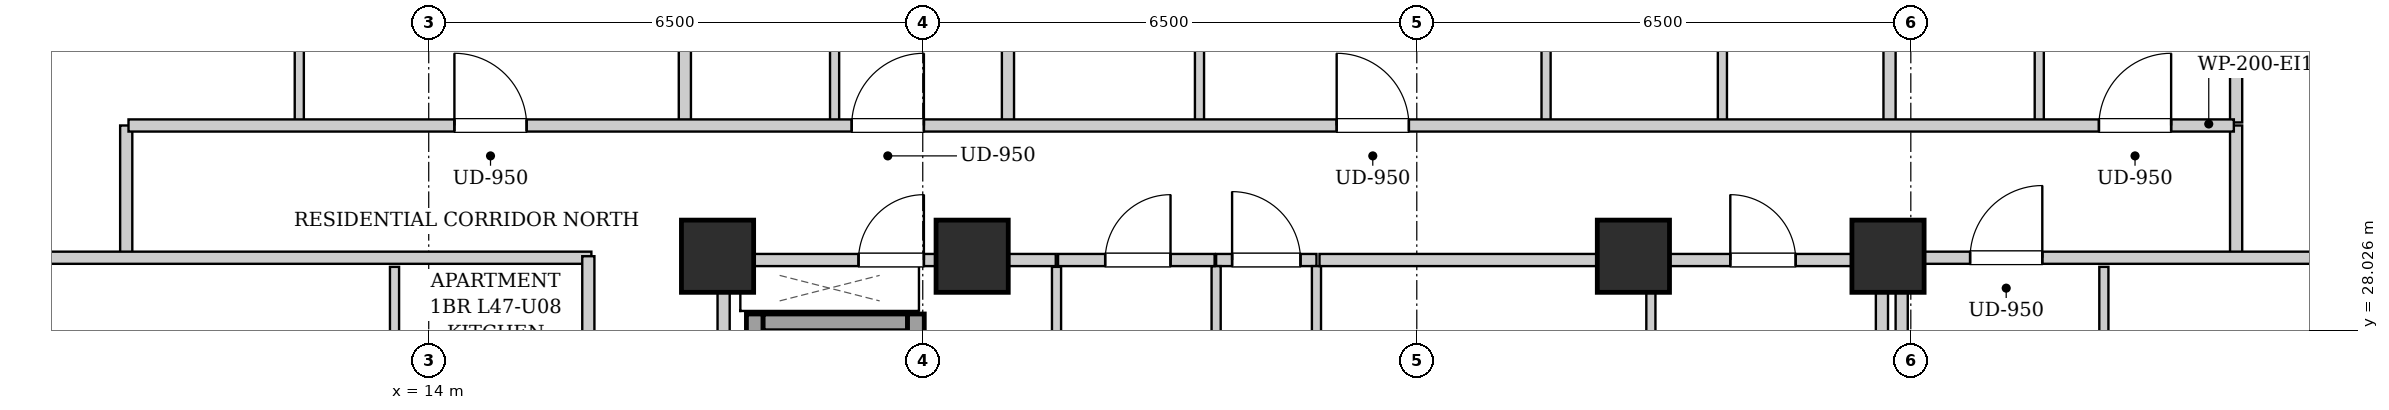
"""IFC4 building model, lengths in metres.
Left out: names, types, materials, properties, quantities, classifications, styles, units other than length and angle.
Written with IfcOpenShell. Run it as: python <this file> out.ifc"""

import sys

from ifc_helpers import new_model, si_unit, direction, frame, frame_2d, origin, origin_2d, place, context, subcontext, project, spatial, rectangle, extrude, element, fill, save


model = new_model("IFC4")
c1 = context("Model", 3, precision=1e-05, world=origin(), true_north=direction((0.0, 1.0)))
c2 = subcontext(c1, "Body", "Model", "MODEL_VIEW")
j1 = project(units=[si_unit("LENGTHUNIT", "METRE"), si_unit("PLANEANGLEUNIT", "RADIAN")], contexts=[c1])
p1 = place(None, origin())
s1 = spatial("IfcSite", under=j1, at=p1, CompositionType="ELEMENT")
p2 = place(p1, origin())
s2 = spatial("IfcBuilding", under=s1, at=p2, CompositionType="ELEMENT")
p3 = place(p2, frame((0.0, 0.0, 163.4)))
s3 = spatial("IfcBuildingStorey", under=s2, at=p3, CompositionType="ELEMENT", Elevation=163.4)
for number, where, z_axis, x_axis in (
    (1, (17.8, 29.0, 0.0), (0.0, 0.0, 1.0), (1.0, 0.0, 0.0)),
    (2, (21.15, 29.0, 0.0), (0.0, 0.0, 1.0), (1.0, 0.0, 0.0)),
    (3, (29.85, 29.0, 0.0), (0.0, 0.0, 1.0), (1.0, 0.0, 0.0)),
    (4, (33.2, 29.0, 0.0), (0.0, 0.0, 1.0), (1.0, 0.0, 0.0)),
):
    element("IfcColumn", number, at=place(p3, frame(where, z_axis=z_axis, x_axis=x_axis)), inside=s3, PredefinedType="COLUMN", context=c2, shape_type="SweptSolid", body=[
        extrude(rectangle(XDim=0.95, YDim=0.95, at=origin_2d()), origin(), (0.0, 0.0, 1.0), 3.25),
    ])
p4 = place(p3, frame((18.29, 24.1, 0.0), z_axis=(0.0, 0.0, 1.0), x_axis=(0.0, 1.0, 0.0)))
e5 = element("IfcWall", 5, at=p4, inside=s3, PredefinedType="SHEAR", context=c2, shape_type="SweptSolid", body=[
    extrude(rectangle(XDim=4.14, YDim=0.22, at=frame_2d((2.07, 0.0))), origin(), (0.0, 0.0, 1.0), 2.99),
])
p5 = place(p3, frame((18.4, 28.13, 0.0), z_axis=(0.0, 0.0, 1.0), x_axis=(1.0, 0.0, 0.0)))
e6 = element("IfcWall", 6, at=p5, inside=s3, PredefinedType="SHEAR", context=c2, shape_type="SweptSolid", body=[
    extrude(rectangle(XDim=1.9, YDim=0.22, at=frame_2d((0.95, 0.0))), origin(), (0.0, 0.0, 1.0), 2.99),
])
p6 = place(p3, frame((20.41, 26.06, 0.0), z_axis=(0.0, 0.0, 1.0), x_axis=(0.0, 1.0, 0.0)))
e7 = element("IfcWall", 7, at=p6, inside=s3, PredefinedType="SHEAR", context=c2, shape_type="SweptSolid", body=[
    extrude(rectangle(XDim=2.18, YDim=0.22, at=frame_2d((1.09, 0.0))), origin(), (0.0, 0.0, 1.0), 2.99),
])
for number, where, z_axis, x_axis in (
    (8, (17.88, 24.12, 0.0), (0.0, 0.0, 1.0), (0.0, 1.0, 0.0)),
    (9, (33.12, 24.12, 0.0), (0.0, 0.0, 1.0), (0.0, 1.0, 0.0)),
):
    element("IfcWall", number, at=place(p3, frame(where, z_axis=z_axis, x_axis=x_axis)), inside=s3, PredefinedType="PARTITIONING", context=c2, shape_type="SweptSolid", body=[
        extrude(rectangle(XDim=4.76, YDim=0.16, at=frame_2d((2.38, 0.0))), origin(), (0.0, 0.0, 1.0), 2.99),
    ])
p7 = place(p3, frame((24.36, 28.95, 0.0), z_axis=(0.0, 0.0, 1.0), x_axis=(1.0, 0.0, 0.0)))
e10 = element("IfcWall", 10, at=p7, inside=s3, PredefinedType="PARTITIONING", context=c2, shape_type="SweptSolid", body=[
    extrude(rectangle(XDim=1.32, YDim=0.16, at=frame_2d((0.66, 0.0))), origin(), (0.0, 0.0, 1.0), 2.442),
])
p8 = place(p7, frame((0.21, 0.0, 0.0)))
e11 = element("IfcOpeningElement", 11, at=p8, cuts=e10, PredefinedType="OPENING", context=c2, shape_type="SweptSolid", body=[
    extrude(rectangle(XDim=0.9, YDim=2.05, at=frame_2d((0.45, 1.025))), frame((0.0, 0.09, 0.0), z_axis=(0.0, -1.0, 0.0), x_axis=(1.0, 0.0, 0.0)), (0.0, 0.0, 1.0), 0.18),
])
p9 = place(p3, frame((17.96, 28.95, 0.0), z_axis=(0.0, 0.0, 1.0), x_axis=(1.0, 0.0, 0.0)))
e12 = element("IfcWall", 12, at=p9, inside=s3, PredefinedType="PARTITIONING", context=c2, shape_type="SweptSolid", body=[
    extrude(rectangle(XDim=4.29, YDim=0.16, at=frame_2d((2.145, 0.0))), origin(), (0.0, 0.0, 1.0), 2.442),
])
p10 = place(p9, frame((1.695, 0.0, 0.0)))
e13 = element("IfcOpeningElement", 13, at=p10, cuts=e12, PredefinedType="OPENING", context=c2, shape_type="SweptSolid", body=[
    extrude(rectangle(XDim=0.86, YDim=2.05, at=frame_2d((0.43, 1.025))), frame((0.0, 0.09, 0.0), z_axis=(0.0, -1.0, 0.0), x_axis=(1.0, 0.0, 0.0)), (0.0, 0.0, 1.0), 0.18),
])
for number, where, z_axis, x_axis in (
    (14, (24.36, 25.0, 0.0), (0.0, 0.0, 1.0), (0.0, 1.0, 0.0)),
    (15, (25.68, 25.0, 0.0), (0.0, 0.0, 1.0), (0.0, 1.0, 0.0)),
):
    element("IfcWall", number, at=place(p3, frame(where, z_axis=z_axis, x_axis=x_axis)), inside=s3, PredefinedType="PARTITIONING", context=c2, shape_type="SweptSolid", body=[
        extrude(rectangle(XDim=3.87, YDim=0.12, at=frame_2d((1.935, 0.0))), origin(), (0.0, 0.0, 1.0), 2.99),
    ])
p11 = place(p3, frame((30.08, 26.18, 0.0), z_axis=(0.0, 0.0, 1.0), x_axis=(0.0, 1.0, 0.0)))
e16 = element("IfcWall", 16, at=p11, inside=s3, PredefinedType="PARTITIONING", context=c2, shape_type="SweptSolid", body=[
    extrude(rectangle(XDim=2.68, YDim=0.12, at=frame_2d((1.34, 0.0))), origin(), (0.0, 0.0, 1.0), 2.99),
])
p12 = place(p3, frame((30.08, 28.95, 0.0), z_axis=(0.0, 0.0, 1.0), x_axis=(1.0, 0.0, 0.0)))
e17 = element("IfcWall", 17, at=p12, inside=s3, PredefinedType="PARTITIONING", context=c2, shape_type="SweptSolid", body=[
    extrude(rectangle(XDim=2.96, YDim=0.16, at=frame_2d((1.48, 0.0))), origin(), (0.0, 0.0, 1.0), 2.99),
])
p13 = place(p12, frame((1.045, 0.0, 0.0)))
e18 = element("IfcOpeningElement", 18, at=p13, cuts=e17, PredefinedType="OPENING", context=c2, shape_type="SweptSolid", body=[
    extrude(rectangle(XDim=0.86, YDim=2.05, at=frame_2d((0.43, 1.025))), frame((0.0, 0.09, 0.0), z_axis=(0.0, -1.0, 0.0), x_axis=(1.0, 0.0, 0.0)), (0.0, 0.0, 1.0), 0.18),
])
p14 = place(p3, frame((22.26, 25.0, 0.0), z_axis=(0.0, 0.0, 1.0), x_axis=(0.0, 1.0, 0.0)))
e19 = element("IfcWall", 19, at=p14, inside=s3, PredefinedType="PARTITIONING", context=c2, shape_type="SweptSolid", body=[
    extrude(rectangle(XDim=3.86, YDim=0.12, at=frame_2d((1.93, 0.0))), origin(), (0.0, 0.0, 1.0), 2.99),
])
p15 = place(p3, frame((22.28, 28.95, 0.0), z_axis=(0.0, 0.0, 1.0), x_axis=(1.0, 0.0, 0.0)))
e20 = element("IfcWall", 20, at=p15, inside=s3, PredefinedType="PARTITIONING", context=c2, shape_type="SweptSolid", body=[
    extrude(rectangle(XDim=2.06, YDim=0.16, at=frame_2d((1.03, 0.0))), origin(), (0.0, 0.0, 1.0), 2.442),
])
p16 = place(p15, frame((0.62, 0.0, 0.0)))
e21 = element("IfcOpeningElement", 21, at=p16, cuts=e20, PredefinedType="OPENING", context=c2, shape_type="SweptSolid", body=[
    extrude(rectangle(XDim=0.86, YDim=2.05, at=frame_2d((0.43, 1.025))), frame((0.0, 0.09, 0.0), z_axis=(0.0, -1.0, 0.0), x_axis=(1.0, 0.0, 0.0)), (0.0, 0.0, 1.0), 0.18),
])
p17 = place(p3, frame((25.72, 28.95, 0.0), z_axis=(0.0, 0.0, 1.0), x_axis=(1.0, 0.0, 0.0)))
e22 = element("IfcWall", 22, at=p17, inside=s3, PredefinedType="PARTITIONING", context=c2, shape_type="SweptSolid", body=[
    extrude(rectangle(XDim=4.32, YDim=0.16, at=frame_2d((2.16, 0.0))), origin(), (0.0, 0.0, 1.0), 2.442),
])
for number, where, z_axis, x_axis in (
    (23, (10.02, 28.98, 0.0), (0.0, 0.0, 1.0), (0.0, 1.0, 0.0)),
    (24, (37.78, 28.98, 0.0), (0.0, 0.0, 1.0), (0.0, 1.0, 0.0)),
):
    element("IfcWall", number, at=place(p3, frame(where, z_axis=z_axis, x_axis=x_axis)), inside=s3, PredefinedType="PARTITIONING", context=c2, shape_type="SweptSolid", body=[
        extrude(rectangle(XDim=1.74, YDim=0.16, at=frame_2d((0.87, 0.0))), origin(), (0.0, 0.0, 1.0), 2.99),
    ])
p18 = place(p3, frame((7.78, 28.98, 0.0), z_axis=(0.0, 0.0, 1.0), x_axis=(1.0, 0.0, 0.0)))
e25 = element("IfcWall", 25, at=p18, inside=s3, PredefinedType="PARTITIONING", context=c2, shape_type="SweptSolid", body=[
    extrude(rectangle(XDim=8.36, YDim=0.16, at=frame_2d((4.18, 0.0))), origin(), (0.0, 0.0, 1.0), 2.442),
])
p19 = place(p3, frame((12.297, 30.76, 0.0), z_axis=(0.0, 0.0, 1.0), x_axis=(0.0, 1.0, 0.0)))
e26 = element("IfcWall", 26, at=p19, inside=s3, PredefinedType="PARTITIONING", context=c2, shape_type="SweptSolid", body=[
    extrude(rectangle(XDim=2.85, YDim=0.12, at=frame_2d((1.425, 0.0))), origin(), (0.0, 0.0, 1.0), 2.99),
])
p20 = place(p19, frame((0.995, 0.0, 0.0)))
e27 = element("IfcOpeningElement", 27, at=p20, cuts=e26, PredefinedType="OPENING", context=c2, shape_type="SweptSolid", body=[
    extrude(rectangle(XDim=0.86, YDim=2.05, at=frame_2d((0.43, 1.025))), frame((0.0, 0.07, 0.0), z_axis=(0.0, -1.0, 0.0), x_axis=(1.0, 0.0, 0.0)), (0.0, 0.0, 1.0), 0.14),
])
p21 = place(p3, frame((17.37, 30.76, 0.0), z_axis=(0.0, 0.0, 1.0), x_axis=(0.0, 1.0, 0.0)))
e28 = element("IfcWall", 28, at=p21, inside=s3, PredefinedType="PARTITIONING", context=c2, shape_type="SweptSolid", body=[
    extrude(rectangle(XDim=12.26, YDim=0.16, at=frame_2d((6.13, 0.0))), origin(), (0.0, 0.0, 1.0), 2.99),
])
p22 = place(p3, frame((19.34, 30.76, 0.0), z_axis=(0.0, 0.0, 1.0), x_axis=(0.0, 1.0, 0.0)))
e29 = element("IfcWall", 29, at=p22, inside=s3, PredefinedType="PARTITIONING", context=c2, shape_type="SweptSolid", body=[
    extrude(rectangle(XDim=2.85, YDim=0.12, at=frame_2d((1.425, 0.0))), origin(), (0.0, 0.0, 1.0), 2.99),
])
p23 = place(p22, frame((0.995, 0.0, 0.0)))
e30 = element("IfcOpeningElement", 30, at=p23, cuts=e29, PredefinedType="OPENING", context=c2, shape_type="SweptSolid", body=[
    extrude(rectangle(XDim=0.86, YDim=2.05, at=frame_2d((0.43, 1.025))), frame((0.0, 0.07, 0.0), z_axis=(0.0, -1.0, 0.0), x_axis=(1.0, 0.0, 0.0)), (0.0, 0.0, 1.0), 0.14),
])
p24 = place(p3, frame((21.621, 30.76, 0.0), z_axis=(0.0, 0.0, 1.0), x_axis=(0.0, 1.0, 0.0)))
e31 = element("IfcWall", 31, at=p24, inside=s3, PredefinedType="PARTITIONING", context=c2, shape_type="SweptSolid", body=[
    extrude(rectangle(XDim=12.26, YDim=0.16, at=frame_2d((6.13, 0.0))), origin(), (0.0, 0.0, 1.0), 2.99),
])
p25 = place(p3, frame((24.141, 30.76, 0.0), z_axis=(0.0, 0.0, 1.0), x_axis=(0.0, 1.0, 0.0)))
e32 = element("IfcWall", 32, at=p25, inside=s3, PredefinedType="PARTITIONING", context=c2, shape_type="SweptSolid", body=[
    extrude(rectangle(XDim=2.85, YDim=0.12, at=frame_2d((1.425, 0.0))), origin(), (0.0, 0.0, 1.0), 2.99),
])
p26 = place(p25, frame((0.995, 0.0, 0.0)))
e33 = element("IfcOpeningElement", 33, at=p26, cuts=e32, PredefinedType="OPENING", context=c2, shape_type="SweptSolid", body=[
    extrude(rectangle(XDim=0.86, YDim=2.05, at=frame_2d((0.43, 1.025))), frame((0.0, 0.07, 0.0), z_axis=(0.0, -1.0, 0.0), x_axis=(1.0, 0.0, 0.0)), (0.0, 0.0, 1.0), 0.14),
])
p27 = place(p3, frame((28.701, 30.76, 0.0), z_axis=(0.0, 0.0, 1.0), x_axis=(0.0, 1.0, 0.0)))
e34 = element("IfcWall", 34, at=p27, inside=s3, PredefinedType="PARTITIONING", context=c2, shape_type="SweptSolid", body=[
    extrude(rectangle(XDim=2.85, YDim=0.12, at=frame_2d((1.425, 0.0))), origin(), (0.0, 0.0, 1.0), 2.99),
])
p28 = place(p27, frame((0.975, 0.0, 0.0)))
e35 = element("IfcOpeningElement", 35, at=p28, cuts=e34, PredefinedType="OPENING", context=c2, shape_type="SweptSolid", body=[
    extrude(rectangle(XDim=0.9, YDim=2.05, at=frame_2d((0.45, 1.025))), frame((0.0, 0.07, 0.0), z_axis=(0.0, -1.0, 0.0), x_axis=(1.0, 0.0, 0.0)), (0.0, 0.0, 1.0), 0.14),
])
p29 = place(p3, frame((31.021, 30.76, 0.0), z_axis=(0.0, 0.0, 1.0), x_axis=(0.0, 1.0, 0.0)))
e36 = element("IfcWall", 36, at=p29, inside=s3, PredefinedType="PARTITIONING", context=c2, shape_type="SweptSolid", body=[
    extrude(rectangle(XDim=2.85, YDim=0.12, at=frame_2d((1.425, 0.0))), origin(), (0.0, 0.0, 1.0), 2.99),
])
p30 = place(p29, frame((0.975, 0.0, 0.0)))
e37 = element("IfcOpeningElement", 37, at=p30, cuts=e36, PredefinedType="OPENING", context=c2, shape_type="SweptSolid", body=[
    extrude(rectangle(XDim=0.9, YDim=2.05, at=frame_2d((0.45, 1.025))), frame((0.0, 0.07, 0.0), z_axis=(0.0, -1.0, 0.0), x_axis=(1.0, 0.0, 0.0)), (0.0, 0.0, 1.0), 0.14),
])
p31 = place(p3, frame((37.78, 30.76, 0.0), z_axis=(0.0, 0.0, 1.0), x_axis=(0.0, 1.0, 0.0)))
e38 = element("IfcWall", 38, at=p31, inside=s3, PredefinedType="PARTITIONING", context=c2, shape_type="SweptSolid", body=[
    extrude(rectangle(XDim=2.91, YDim=0.16, at=frame_2d((1.455, 0.0))), origin(), (0.0, 0.0, 1.0), 2.99),
])
p32 = place(p3, frame((33.22, 30.76, 0.0), z_axis=(0.0, 0.0, 1.0), x_axis=(0.0, 1.0, 0.0)))
e39 = element("IfcWall", 39, at=p32, inside=s3, PredefinedType="PARTITIONING", context=c2, shape_type="SweptSolid", body=[
    extrude(rectangle(XDim=10.28, YDim=0.16, at=frame_2d((5.14, 0.0))), origin(), (0.0, 0.0, 1.0), 2.442),
])
p33 = place(p3, frame((35.19, 30.76, 0.0), z_axis=(0.0, 0.0, 1.0), x_axis=(0.0, 1.0, 0.0)))
e40 = element("IfcWall", 40, at=p33, inside=s3, PredefinedType="PARTITIONING", context=c2, shape_type="SweptSolid", body=[
    extrude(rectangle(XDim=2.85, YDim=0.12, at=frame_2d((1.425, 0.0))), origin(), (0.0, 0.0, 1.0), 2.99),
])
p34 = place(p33, frame((0.995, 0.0, 0.0)))
e41 = element("IfcOpeningElement", 41, at=p34, cuts=e40, PredefinedType="OPENING", context=c2, shape_type="SweptSolid", body=[
    extrude(rectangle(XDim=0.86, YDim=2.05, at=frame_2d((0.43, 1.025))), frame((0.0, 0.07, 0.0), z_axis=(0.0, -1.0, 0.0), x_axis=(1.0, 0.0, 0.0)), (0.0, 0.0, 1.0), 0.14),
])
p35 = place(p3, frame((13.55, 25.052, 0.0), z_axis=(0.0, 0.0, 1.0), x_axis=(0.0, 1.0, 0.0)))
e42 = element("IfcWall", 42, at=p35, inside=s3, PredefinedType="PARTITIONING", context=c2, shape_type="SweptSolid", body=[
    extrude(rectangle(XDim=3.808, YDim=0.12, at=frame_2d((1.904, 0.0))), origin(), (0.0, 0.0, 1.0), 2.99),
])
p36 = place(p35, frame((1.454, 0.0, 0.0)))
e43 = element("IfcOpeningElement", 43, at=p36, cuts=e42, PredefinedType="OPENING", context=c2, shape_type="SweptSolid", body=[
    extrude(rectangle(XDim=0.9, YDim=2.05, at=frame_2d((0.45, 1.025))), frame((0.0, 0.07, 0.0), z_axis=(0.0, -1.0, 0.0), x_axis=(1.0, 0.0, 0.0)), (0.0, 0.0, 1.0), 0.14),
])
p37 = place(p3, frame((33.38, 28.98, 0.0), z_axis=(0.0, 0.0, 1.0), x_axis=(1.0, 0.0, 0.0)))
e44 = element("IfcWall", 44, at=p37, inside=s3, PredefinedType="PARTITIONING", context=c2, shape_type="SweptSolid", body=[
    extrude(rectangle(XDim=6.64, YDim=0.16, at=frame_2d((3.32, 0.0))), origin(), (0.0, 0.0, 1.0), 2.442),
])
p38 = place(p37, frame((0.9, 0.0, 0.0)))
e45 = element("IfcOpeningElement", 45, at=p38, cuts=e44, PredefinedType="OPENING", context=c2, shape_type="SweptSolid", body=[
    extrude(rectangle(XDim=0.95, YDim=2.1, at=frame_2d((0.475, 1.05))), frame((0.0, 0.09, 0.0), z_axis=(0.0, -1.0, 0.0), x_axis=(1.0, 0.0, 0.0)), (0.0, 0.0, 1.0), 0.18),
])
p39 = place(p3, frame((36.04, 25.052, 0.0), z_axis=(0.0, 0.0, 1.0), x_axis=(0.0, 1.0, 0.0)))
e46 = element("IfcWall", 46, at=p39, inside=s3, PredefinedType="PARTITIONING", context=c2, shape_type="SweptSolid", body=[
    extrude(rectangle(XDim=3.808, YDim=0.12, at=frame_2d((1.904, 0.0))), origin(), (0.0, 0.0, 1.0), 2.99),
])
p40 = place(p39, frame((1.454, 0.0, 0.0)))
e47 = element("IfcOpeningElement", 47, at=p40, cuts=e46, PredefinedType="OPENING", context=c2, shape_type="SweptSolid", body=[
    extrude(rectangle(XDim=0.9, YDim=2.05, at=frame_2d((0.45, 1.025))), frame((0.0, 0.07, 0.0), z_axis=(0.0, -1.0, 0.0), x_axis=(1.0, 0.0, 0.0)), (0.0, 0.0, 1.0), 0.14),
])
p41 = place(p3, frame((10.05, 30.72, 0.0), z_axis=(0.0, 0.0, 1.0), x_axis=(1.0, 0.0, 0.0)))
e48 = element("IfcWall", 48, at=p41, inside=s3, PredefinedType="PARTITIONING", context=c2, shape_type="SweptSolid", body=[
    extrude(rectangle(XDim=27.7, YDim=0.16, at=frame_2d((13.85, 0.0))), origin(), (0.0, 0.0, 1.0), 2.99),
])
p42 = place(p41, frame((4.288, 0.0, 0.0)))
e49 = element("IfcOpeningElement", 49, at=p42, cuts=e48, PredefinedType="OPENING", context=c2, shape_type="SweptSolid", body=[
    extrude(rectangle(XDim=0.95, YDim=2.1, at=frame_2d((0.475, 1.05))), frame((0.0, 0.09, 0.0), z_axis=(0.0, -1.0, 0.0), x_axis=(1.0, 0.0, 0.0)), (0.0, 0.0, 1.0), 0.18),
])
p43 = place(p41, frame((9.515, 0.0, 0.0)))
e50 = element("IfcOpeningElement", 50, at=p43, cuts=e48, PredefinedType="OPENING", context=c2, shape_type="SweptSolid", body=[
    extrude(rectangle(XDim=0.95, YDim=2.1, at=frame_2d((0.475, 1.05))), frame((0.0, 0.09, 0.0), z_axis=(0.0, -1.0, 0.0), x_axis=(1.0, 0.0, 0.0)), (0.0, 0.0, 1.0), 0.18),
])
p44 = place(p41, frame((15.896, 0.0, 0.0)))
e51 = element("IfcOpeningElement", 51, at=p44, cuts=e48, PredefinedType="OPENING", context=c2, shape_type="SweptSolid", body=[
    extrude(rectangle(XDim=0.95, YDim=2.1, at=frame_2d((0.475, 1.05))), frame((0.0, 0.09, 0.0), z_axis=(0.0, -1.0, 0.0), x_axis=(1.0, 0.0, 0.0)), (0.0, 0.0, 1.0), 0.18),
])
p45 = place(p41, frame((25.925, 0.0, 0.0)))
e52 = element("IfcOpeningElement", 52, at=p45, cuts=e48, PredefinedType="OPENING", context=c2, shape_type="SweptSolid", body=[
    extrude(rectangle(XDim=0.95, YDim=2.1, at=frame_2d((0.475, 1.05))), frame((0.0, 0.09, 0.0), z_axis=(0.0, -1.0, 0.0), x_axis=(1.0, 0.0, 0.0)), (0.0, 0.0, 1.0), 0.18),
])
p46 = place(p3, frame((16.1, 15.07, 0.0), z_axis=(0.0, 0.0, 1.0), x_axis=(0.0, 1.0, 0.0)))
e53 = element("IfcWall", 53, at=p46, inside=s3, PredefinedType="PARTITIONING", context=c2, shape_type="SweptSolid", body=[
    extrude(rectangle(XDim=13.93, YDim=0.16, at=frame_2d((6.965, 0.0))), origin(), (0.0, 0.0, 1.0), 2.99),
])
p47 = place(p46, frame((4.661, 0.0, 0.0)))
e54 = element("IfcOpeningElement", 54, at=p47, cuts=e53, PredefinedType="OPENING", context=c2, shape_type="SweptSolid", body=[
    extrude(rectangle(XDim=0.95, YDim=2.1, at=frame_2d((0.475, 1.05))), frame((0.0, 0.09, 0.0), z_axis=(0.0, -1.0, 0.0), x_axis=(1.0, 0.0, 0.0)), (0.0, 0.0, 1.0), 0.18),
])
p48 = place(p46, frame((11.411, 0.0, 0.0)))
e55 = element("IfcOpeningElement", 55, at=p48, cuts=e53, PredefinedType="OPENING", context=c2, shape_type="SweptSolid", body=[
    extrude(rectangle(XDim=0.95, YDim=2.1, at=frame_2d((0.475, 1.05))), frame((0.0, 0.09, 0.0), z_axis=(0.0, -1.0, 0.0), x_axis=(1.0, 0.0, 0.0)), (0.0, 0.0, 1.0), 0.18),
])
p49 = place(p3, frame((33.38, 15.02, 0.0), z_axis=(0.0, 0.0, 1.0), x_axis=(0.0, 1.0, 0.0)))
e56 = element("IfcWall", 56, at=p49, inside=s3, PredefinedType="PARTITIONING", context=c2, shape_type="SweptSolid", body=[
    extrude(rectangle(XDim=13.98, YDim=0.16, at=frame_2d((6.99, 0.0))), origin(), (0.0, 0.0, 1.0), 2.99),
])
p50 = place(p8, origin())
e57 = element("IfcDoor", 57, at=p50, inside=s3, OperationType="SINGLE_SWING_LEFT", PredefinedType="DOOR", context=c2, shape_type="SweptSolid", body=[
    extrude(rectangle(XDim=0.9, YDim=2.05, at=frame_2d((0.45, 1.025))), frame((0.0, 0.025, 0.0), z_axis=(0.0, -1.0, 0.0), x_axis=(1.0, 0.0, 0.0)), (0.0, 0.0, 1.0), 0.05),
])
fill(e11, e57)
p51 = place(p10, origin())
e58 = element("IfcDoor", 58, at=p51, inside=s3, OperationType="SINGLE_SWING_RIGHT", PredefinedType="DOOR", context=c2, shape_type="SweptSolid", body=[
    extrude(rectangle(XDim=0.86, YDim=2.05, at=frame_2d((0.43, 1.025))), frame((0.0, 0.025, 0.0), z_axis=(0.0, -1.0, 0.0), x_axis=(1.0, 0.0, 0.0)), (0.0, 0.0, 1.0), 0.05),
])
fill(e13, e58)
p52 = place(p13, origin())
e59 = element("IfcDoor", 59, at=p52, inside=s3, OperationType="SINGLE_SWING_LEFT", PredefinedType="DOOR", context=c2, shape_type="SweptSolid", body=[
    extrude(rectangle(XDim=0.86, YDim=2.05, at=frame_2d((0.43, 1.025))), frame((0.0, 0.025, 0.0), z_axis=(0.0, -1.0, 0.0), x_axis=(1.0, 0.0, 0.0)), (0.0, 0.0, 1.0), 0.05),
])
fill(e18, e59)
p53 = place(p16, origin())
e60 = element("IfcDoor", 60, at=p53, inside=s3, OperationType="SINGLE_SWING_RIGHT", PredefinedType="DOOR", context=c2, shape_type="SweptSolid", body=[
    extrude(rectangle(XDim=0.86, YDim=2.05, at=frame_2d((0.43, 1.025))), frame((0.0, 0.025, 0.0), z_axis=(0.0, -1.0, 0.0), x_axis=(1.0, 0.0, 0.0)), (0.0, 0.0, 1.0), 0.05),
])
fill(e21, e60)
p54 = place(p38, origin())
e61 = element("IfcDoor", 61, at=p54, inside=s3, OperationType="SINGLE_SWING_RIGHT", PredefinedType="DOOR", context=c2, shape_type="SweptSolid", body=[
    extrude(rectangle(XDim=0.95, YDim=2.1, at=frame_2d((0.475, 1.05))), frame((0.0, 0.025, 0.0), z_axis=(0.0, -1.0, 0.0), x_axis=(1.0, 0.0, 0.0)), (0.0, 0.0, 1.0), 0.05),
])
fill(e45, e61)
p55 = place(p42, origin())
e62 = element("IfcDoor", 62, at=p55, inside=s3, OperationType="SINGLE_SWING_LEFT", PredefinedType="DOOR", context=c2, shape_type="SweptSolid", body=[
    extrude(rectangle(XDim=0.95, YDim=2.1, at=frame_2d((0.475, 1.05))), frame((0.0, 0.025, 0.0), z_axis=(0.0, -1.0, 0.0), x_axis=(1.0, 0.0, 0.0)), (0.0, 0.0, 1.0), 0.05),
])
fill(e49, e62)
p56 = place(p43, origin())
e63 = element("IfcDoor", 63, at=p56, inside=s3, OperationType="SINGLE_SWING_RIGHT", PredefinedType="DOOR", context=c2, shape_type="SweptSolid", body=[
    extrude(rectangle(XDim=0.95, YDim=2.1, at=frame_2d((0.475, 1.05))), frame((0.0, 0.025, 0.0), z_axis=(0.0, -1.0, 0.0), x_axis=(1.0, 0.0, 0.0)), (0.0, 0.0, 1.0), 0.05),
])
fill(e50, e63)
p57 = place(p44, origin())
e64 = element("IfcDoor", 64, at=p57, inside=s3, OperationType="SINGLE_SWING_LEFT", PredefinedType="DOOR", context=c2, shape_type="SweptSolid", body=[
    extrude(rectangle(XDim=0.95, YDim=2.1, at=frame_2d((0.475, 1.05))), frame((0.0, 0.025, 0.0), z_axis=(0.0, -1.0, 0.0), x_axis=(1.0, 0.0, 0.0)), (0.0, 0.0, 1.0), 0.05),
])
fill(e51, e64)
p58 = place(p45, origin())
e65 = element("IfcDoor", 65, at=p58, inside=s3, OperationType="SINGLE_SWING_RIGHT", PredefinedType="DOOR", context=c2, shape_type="SweptSolid", body=[
    extrude(rectangle(XDim=0.95, YDim=2.1, at=frame_2d((0.475, 1.05))), frame((0.0, 0.025, 0.0), z_axis=(0.0, -1.0, 0.0), x_axis=(1.0, 0.0, 0.0)), (0.0, 0.0, 1.0), 0.05),
])
fill(e52, e65)
save(model, sys.argv[1])
